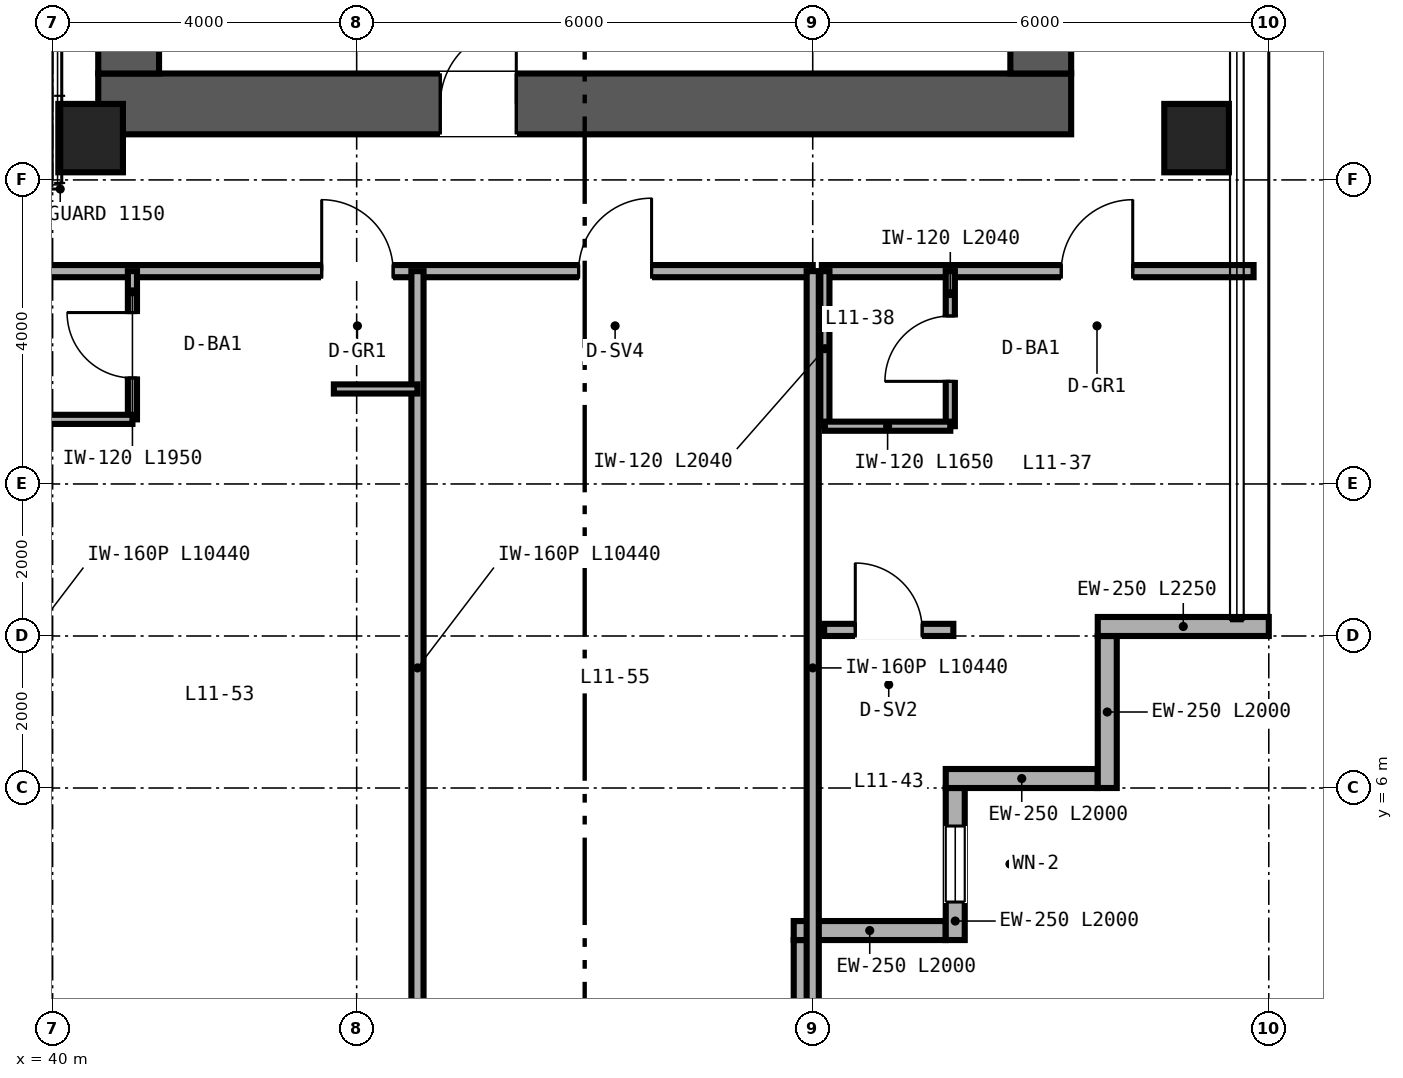
"""IFC4 building model, lengths in metres.
Left out: names, types, materials, properties, quantities, classifications, styles, units other than length and angle.
Written with IfcOpenShell. Run it as: python <this file> out.ifc"""

import sys

from ifc_helpers import new_model, si_unit, direction, frame, frame_2d, origin, origin_2d, place, context, subcontext, project, spatial, rectangle, hollow_rectangle, extrude, source, transform, mapped, element, fill, save


model = new_model("IFC4")
c1 = context("Model", 3, precision=1e-05, world=origin(), true_north=direction((0.0, 1.0)))
c2 = subcontext(c1, "Body", "Model", "MODEL_VIEW")
j1 = project(units=[si_unit("LENGTHUNIT", "METRE"), si_unit("PLANEANGLEUNIT", "RADIAN")], contexts=[c1])
p1 = place(None, origin())
s1 = spatial("IfcSite", under=j1, at=p1, CompositionType="ELEMENT")
p2 = place(p1, origin())
s2 = spatial("IfcBuilding", under=s1, at=p2, CompositionType="ELEMENT")
p3 = place(p2, frame((0.0, 0.0, 49.2)))
s3 = spatial("IfcBuildingStorey", under=s2, at=p3, CompositionType="ELEMENT", Elevation=49.2)
p4 = place(p3, frame((40.6, 15.0, 0.0), z_axis=(0.0, 0.0, 1.0), x_axis=(1.0, 0.0, 0.0)))
e1 = element("IfcWall", 1, at=p4, inside=s3, PredefinedType="SHEAR", context=c2, shape_type="SweptSolid", body=[
    extrude(rectangle(XDim=12.8, YDim=0.8, at=frame_2d((6.4, 0.0))), origin(), (0.0, 0.0, 1.0), 3.35),
])
p5 = place(p4, frame((4.5, 0.0, 0.0)))
e2 = element("IfcOpeningElement", 2, at=p5, cuts=e1, PredefinedType="OPENING", context=c2, shape_type="SweptSolid", body=[
    extrude(rectangle(XDim=1.0, YDim=2.15, at=frame_2d((0.5, 1.075))), frame((0.0, 0.41, 0.0), z_axis=(0.0, -1.0, 0.0), x_axis=(1.0, 0.0, 0.0)), (0.0, 0.0, 1.0), 0.82),
])
for number, where, z_axis, x_axis in (
    (3, (41.0, 15.4, 0.0), (0.0, 0.0, 1.0), (0.0, 1.0, 0.0)),
    (4, (53.0, 15.4, 0.0), (0.0, 0.0, 1.0), (0.0, 1.0, 0.0)),
):
    element("IfcWall", number, at=place(p3, frame(where, z_axis=z_axis, x_axis=x_axis)), inside=s3, PredefinedType="SHEAR", context=c2, shape_type="SweptSolid", body=[
        extrude(rectangle(XDim=21.2, YDim=0.8, at=frame_2d((10.6, 0.0))), origin(), (0.0, 0.0, 1.0), 3.35),
    ])
m1 = source(origin(), c2, "Body", "SweptSolid", [
    extrude(hollow_rectangle(XDim=0.85, YDim=0.9, WallThickness=0.04, at=origin_2d()), origin(), (0.0, 0.0, 1.0), 3.35),
])
for number, where, z_axis, x_axis in (
    (5, (40.5, 14.55, 0.0), (0.0, 0.0, 1.0), (1.0, 0.0, 0.0)),
    (6, (55.05, 14.55, 0.0), (0.0, 0.0, 1.0), (1.0, 0.0, 0.0)),
):
    element("IfcColumn", number, at=place(p3, frame(where, z_axis=z_axis, x_axis=x_axis)), inside=s3, PredefinedType="COLUMN", context=c2, shape_type="MappedRepresentation", body=[
        mapped(m1, transform((0.0, 0.0, 0.0), scale=1.0)),
    ])
p6 = place(p3, frame((49.875, 2.0, 0.0), z_axis=(0.0, 0.0, 1.0), x_axis=(0.0, 1.0, 0.0)))
e7 = element("IfcWall", 7, at=p6, inside=s3, PredefinedType="SOLIDWALL", context=c2, shape_type="SweptSolid", body=[
    extrude(rectangle(XDim=2.0, YDim=0.25, at=frame_2d((1.0, 0.0))), origin(), (0.0, 0.0, 1.0), 2.657),
])
p7 = place(p3, frame((49.75, 4.125, 0.0), z_axis=(0.0, 0.0, 1.0), x_axis=(1.0, 0.0, 0.0)))
e8 = element("IfcWall", 8, at=p7, inside=s3, PredefinedType="SOLIDWALL", context=c2, shape_type="SweptSolid", body=[
    extrude(rectangle(XDim=2.0, YDim=0.25, at=frame_2d((1.0, 0.0))), origin(), (0.0, 0.0, 1.0), 3.35),
])
p8 = place(p3, frame((51.875, 4.0, 0.0), z_axis=(0.0, 0.0, 1.0), x_axis=(0.0, 1.0, 0.0)))
e9 = element("IfcWall", 9, at=p8, inside=s3, PredefinedType="SOLIDWALL", context=c2, shape_type="SweptSolid", body=[
    extrude(rectangle(XDim=2.0, YDim=0.25, at=frame_2d((1.0, 0.0))), origin(), (0.0, 0.0, 1.0), 3.35),
])
p9 = place(p8, frame((0.5, 0.0, 0.85)))
e10 = element("IfcOpeningElement", 10, at=p9, cuts=e9, PredefinedType="OPENING", context=c2, shape_type="SweptSolid", body=[
    extrude(rectangle(XDim=1.0, YDim=1.9, at=frame_2d((0.5, 0.95))), frame((0.0, 0.135, 0.0), z_axis=(0.0, -1.0, 0.0), x_axis=(1.0, 0.0, 0.0)), (0.0, 0.0, 1.0), 0.27),
])
for number, where, z_axis, x_axis in (
    (11, (51.75, 6.125, 0.0), (0.0, 0.0, 1.0), (1.0, 0.0, 0.0)),
    (12, (53.875, 6.0, 0.0), (0.0, 0.0, 1.0), (0.0, 1.0, 0.0)),
):
    element("IfcWall", number, at=place(p3, frame(where, z_axis=z_axis, x_axis=x_axis)), inside=s3, PredefinedType="SOLIDWALL", context=c2, shape_type="SweptSolid", body=[
        extrude(rectangle(XDim=2.0, YDim=0.25, at=frame_2d((1.0, 0.0))), origin(), (0.0, 0.0, 1.0), 3.35),
    ])
p10 = place(p3, frame((53.75, 8.125, 0.0), z_axis=(0.0, 0.0, 1.0), x_axis=(1.0, 0.0, 0.0)))
e13 = element("IfcWall", 13, at=p10, inside=s3, PredefinedType="SOLIDWALL", context=c2, shape_type="SweptSolid", body=[
    extrude(rectangle(XDim=2.25, YDim=0.25, at=frame_2d((1.125, 0.0))), origin(), (0.0, 0.0, 1.0), 3.35),
])
p11 = place(p3, frame((50.12, 12.8, 0.0), z_axis=(0.0, 0.0, 1.0), x_axis=(1.0, 0.0, 0.0)))
e14 = element("IfcWall", 14, at=p11, inside=s3, PredefinedType="PARTITIONING", context=c2, shape_type="SweptSolid", body=[
    extrude(rectangle(XDim=5.68, YDim=0.16, at=frame_2d((2.84, 0.0))), origin(), (0.0, 0.0, 1.0), 3.35),
])
p12 = place(p11, frame((3.15, 0.0, 0.0)))
e15 = element("IfcOpeningElement", 15, at=p12, cuts=e14, PredefinedType="OPENING", context=c2, shape_type="SweptSolid", body=[
    extrude(rectangle(XDim=0.94, YDim=2.15, at=frame_2d((0.47, 1.075))), frame((0.0, 0.09, 0.0), z_axis=(0.0, -1.0, 0.0), x_axis=(1.0, 0.0, 0.0)), (0.0, 0.0, 1.0), 0.18),
])
p13 = place(p3, frame((51.81, 10.76, 0.0), z_axis=(0.0, 0.0, 1.0), x_axis=(0.0, 1.0, 0.0)))
e16 = element("IfcWall", 16, at=p13, inside=s3, PredefinedType="PARTITIONING", context=c2, shape_type="SweptSolid", body=[
    extrude(rectangle(XDim=2.04, YDim=0.12, at=frame_2d((1.02, 0.0))), origin(), (0.0, 0.0, 1.0), 3.35),
])
p14 = place(p13, frame((0.59, 0.0, 0.0)))
e17 = element("IfcOpeningElement", 17, at=p14, cuts=e16, PredefinedType="OPENING", context=c2, shape_type="SweptSolid", body=[
    extrude(rectangle(XDim=0.86, YDim=2.1, at=frame_2d((0.43, 1.05))), frame((0.0, 0.07, 0.0), z_axis=(0.0, -1.0, 0.0), x_axis=(1.0, 0.0, 0.0)), (0.0, 0.0, 1.0), 0.14),
])
p15 = place(p3, frame((50.16, 10.76, 0.0), z_axis=(0.0, 0.0, 1.0), x_axis=(0.0, 1.0, 0.0)))
e18 = element("IfcWall", 18, at=p15, inside=s3, PredefinedType="PARTITIONING", context=c2, shape_type="SweptSolid", body=[
    extrude(rectangle(XDim=2.04, YDim=0.12, at=frame_2d((1.02, 0.0))), origin(), (0.0, 0.0, 1.0), 3.35),
])
p16 = place(p3, frame((50.16, 10.76, 0.0), z_axis=(0.0, 0.0, 1.0), x_axis=(1.0, 0.0, 0.0)))
e19 = element("IfcWall", 19, at=p16, inside=s3, PredefinedType="PARTITIONING", context=c2, shape_type="SweptSolid", body=[
    extrude(rectangle(XDim=1.65, YDim=0.12, at=frame_2d((0.825, 0.0))), origin(), (0.0, 0.0, 1.0), 3.35),
])
p17 = place(p3, frame((50.15, 8.08, 0.0), z_axis=(0.0, 0.0, 1.0), x_axis=(1.0, 0.0, 0.0)))
e20 = element("IfcWall", 20, at=p17, inside=s3, PredefinedType="PARTITIONING", context=c2, shape_type="SweptSolid", body=[
    extrude(rectangle(XDim=1.7, YDim=0.16, at=frame_2d((0.85, 0.0))), origin(), (0.0, 0.0, 1.0), 3.35),
])
p18 = place(p17, frame((0.41, 0.0, 0.0)))
e21 = element("IfcOpeningElement", 21, at=p18, cuts=e20, PredefinedType="OPENING", context=c2, shape_type="SweptSolid", body=[
    extrude(rectangle(XDim=0.88, YDim=2.15, at=frame_2d((0.44, 1.075))), frame((0.0, 0.09, 0.0), z_axis=(0.0, -1.0, 0.0), x_axis=(1.0, 0.0, 0.0)), (0.0, 0.0, 1.0), 0.18),
])
p19 = place(p3, frame((14.0, 12.8, 0.0), z_axis=(0.0, 0.0, 1.0), x_axis=(1.0, 0.0, 0.0)))
e22 = element("IfcWall", 22, at=p19, inside=s3, PredefinedType="PARTITIONING", context=c2, shape_type="SweptSolid", body=[
    extrude(rectangle(XDim=36.0, YDim=0.16, at=frame_2d((18.0, 0.0))), origin(), (0.0, 0.0, 1.0), 2.571),
])
p20 = place(p19, frame((5.14, 0.0, 0.0)))
e23 = element("IfcOpeningElement", 23, at=p20, cuts=e22, PredefinedType="OPENING", context=c2, shape_type="SweptSolid", body=[
    extrude(rectangle(XDim=0.94, YDim=2.15, at=frame_2d((0.47, 1.075))), frame((0.0, 0.09, 0.0), z_axis=(0.0, -1.0, 0.0), x_axis=(1.0, 0.0, 0.0)), (0.0, 0.0, 1.0), 0.18),
])
p21 = place(p19, frame((11.34, 0.0, 0.0)))
e24 = element("IfcOpeningElement", 24, at=p21, cuts=e22, PredefinedType="OPENING", context=c2, shape_type="SweptSolid", body=[
    extrude(rectangle(XDim=0.94, YDim=2.15, at=frame_2d((0.47, 1.075))), frame((0.0, 0.09, 0.0), z_axis=(0.0, -1.0, 0.0), x_axis=(1.0, 0.0, 0.0)), (0.0, 0.0, 1.0), 0.18),
])
p22 = place(p19, frame((17.94, 0.0, 0.0)))
e25 = element("IfcOpeningElement", 25, at=p22, cuts=e22, PredefinedType="OPENING", context=c2, shape_type="SweptSolid", body=[
    extrude(rectangle(XDim=0.94, YDim=2.15, at=frame_2d((0.47, 1.075))), frame((0.0, 0.09, 0.0), z_axis=(0.0, -1.0, 0.0), x_axis=(1.0, 0.0, 0.0)), (0.0, 0.0, 1.0), 0.18),
])
p23 = place(p19, frame((21.82, 0.0, 0.0)))
e26 = element("IfcOpeningElement", 26, at=p23, cuts=e22, PredefinedType="OPENING", context=c2, shape_type="SweptSolid", body=[
    extrude(rectangle(XDim=0.96, YDim=2.15, at=frame_2d((0.48, 1.075))), frame((0.0, 0.09, 0.0), z_axis=(0.0, -1.0, 0.0), x_axis=(1.0, 0.0, 0.0)), (0.0, 0.0, 1.0), 0.18),
])
p24 = place(p19, frame((29.54, 0.0, 0.0)))
e27 = element("IfcOpeningElement", 27, at=p24, cuts=e22, PredefinedType="OPENING", context=c2, shape_type="SweptSolid", body=[
    extrude(rectangle(XDim=0.94, YDim=2.15, at=frame_2d((0.47, 1.075))), frame((0.0, 0.09, 0.0), z_axis=(0.0, -1.0, 0.0), x_axis=(1.0, 0.0, 0.0)), (0.0, 0.0, 1.0), 0.18),
])
p25 = place(p19, frame((32.92, 0.0, 0.0)))
e28 = element("IfcOpeningElement", 28, at=p25, cuts=e22, PredefinedType="OPENING", context=c2, shape_type="SweptSolid", body=[
    extrude(rectangle(XDim=0.96, YDim=2.15, at=frame_2d((0.48, 1.075))), frame((0.0, 0.09, 0.0), z_axis=(0.0, -1.0, 0.0), x_axis=(1.0, 0.0, 0.0)), (0.0, 0.0, 1.0), 0.18),
])
for number, where, z_axis, x_axis in (
    (29, (50.0, 2.36, 0.0), (0.0, 0.0, 1.0), (0.0, 1.0, 0.0)),
    (30, (44.8, 2.36, 0.0), (0.0, 0.0, 1.0), (0.0, 1.0, 0.0)),
):
    element("IfcWall", number, at=place(p3, frame(where, z_axis=z_axis, x_axis=x_axis)), inside=s3, PredefinedType="PARTITIONING", context=c2, shape_type="SweptSolid", body=[
        extrude(rectangle(XDim=10.44, YDim=0.16, at=frame_2d((5.22, 0.0))), origin(), (0.0, 0.0, 1.0), 2.657),
    ])
p26 = place(p3, frame((41.05, 10.85, 0.0), z_axis=(0.0, 0.0, 1.0), x_axis=(0.0, 1.0, 0.0)))
e31 = element("IfcWall", 31, at=p26, inside=s3, PredefinedType="PARTITIONING", context=c2, shape_type="SweptSolid", body=[
    extrude(rectangle(XDim=1.95, YDim=0.12, at=frame_2d((0.975, 0.0))), origin(), (0.0, 0.0, 1.0), 3.35),
])
p27 = place(p26, frame((0.545, 0.0, 0.0)))
e32 = element("IfcOpeningElement", 32, at=p27, cuts=e31, PredefinedType="OPENING", context=c2, shape_type="SweptSolid", body=[
    extrude(rectangle(XDim=0.86, YDim=2.1, at=frame_2d((0.43, 1.05))), frame((0.0, 0.07, 0.0), z_axis=(0.0, -1.0, 0.0), x_axis=(1.0, 0.0, 0.0)), (0.0, 0.0, 1.0), 0.14),
])
p28 = place(p3, frame((39.4, 10.85, 0.0), z_axis=(0.0, 0.0, 1.0), x_axis=(1.0, 0.0, 0.0)))
e33 = element("IfcWall", 33, at=p28, inside=s3, PredefinedType="PARTITIONING", context=c2, shape_type="SweptSolid", body=[
    extrude(rectangle(XDim=1.65, YDim=0.12, at=frame_2d((0.825, 0.0))), origin(), (0.0, 0.0, 1.0), 2.571),
])
p29 = place(p3, frame((43.7, 11.25, 0.0), z_axis=(0.0, 0.0, 1.0), x_axis=(1.0, 0.0, 0.0)))
e34 = element("IfcWall", 34, at=p29, inside=s3, PredefinedType="PARTITIONING", context=c2, shape_type="SweptSolid", body=[
    extrude(rectangle(XDim=1.1, YDim=0.12, at=frame_2d((0.55, 0.0))), origin(), (0.0, 0.0, 1.0), 3.35),
])
m2 = source(origin(), c2, "Body", "SweptSolid", [
    extrude(rectangle(XDim=1.0, YDim=1.9, at=frame_2d((0.5, 0.95))), frame((0.0, 0.03, 0.0), z_axis=(0.0, -1.0, 0.0), x_axis=(1.0, 0.0, 0.0)), (0.0, 0.0, 1.0), 0.06),
])
p30 = place(p9, origin())
e35 = element("IfcWindow", 35, at=p30, inside=s3, PartitioningType="SINGLE_PANEL", PredefinedType="WINDOW", context=c2, shape_type="MappedRepresentation", body=[
    mapped(m2, transform((0.0, 0.0, 0.0), scale=1.0)),
])
fill(e10, e35)
m3 = source(origin(), c2, "Body", "SweptSolid", [
    extrude(rectangle(XDim=1.0, YDim=2.15, at=frame_2d((0.5, 1.075))), frame((0.0, 0.025, 0.0), z_axis=(0.0, -1.0, 0.0), x_axis=(1.0, 0.0, 0.0)), (0.0, 0.0, 1.0), 0.05),
])
p31 = place(p5, origin())
e36 = element("IfcDoor", 36, at=p31, inside=s3, OperationType="SINGLE_SWING_RIGHT", PredefinedType="DOOR", context=c2, shape_type="MappedRepresentation", body=[
    mapped(m3, transform((0.0, 0.0, 0.0), scale=1.0)),
])
fill(e2, e36)
m4 = source(origin(), c2, "Body", "SweptSolid", [
    extrude(rectangle(XDim=0.86, YDim=2.1, at=frame_2d((0.43, 1.05))), frame((0.0, 0.025, 0.0), z_axis=(0.0, -1.0, 0.0), x_axis=(1.0, 0.0, 0.0)), (0.0, 0.0, 1.0), 0.05),
])
p32 = place(p14, origin())
e37 = element("IfcDoor", 37, at=p32, inside=s3, OperationType="SINGLE_SWING_LEFT", PredefinedType="DOOR", context=c2, shape_type="MappedRepresentation", body=[
    mapped(m4, transform((0.0, 0.0, 0.0), scale=1.0)),
])
fill(e17, e37)
m5 = source(origin(), c2, "Body", "SweptSolid", [
    extrude(rectangle(XDim=0.94, YDim=2.15, at=frame_2d((0.47, 1.075))), frame((0.0, 0.025, 0.0), z_axis=(0.0, -1.0, 0.0), x_axis=(1.0, 0.0, 0.0)), (0.0, 0.0, 1.0), 0.05),
])
p33 = place(p12, origin())
e38 = element("IfcDoor", 38, at=p33, inside=s3, OperationType="SINGLE_SWING_RIGHT", PredefinedType="DOOR", context=c2, shape_type="MappedRepresentation", body=[
    mapped(m5, transform((0.0, 0.0, 0.0), scale=1.0)),
])
fill(e15, e38)
m6 = source(origin(), c2, "Body", "SweptSolid", [
    extrude(rectangle(XDim=0.88, YDim=2.15, at=frame_2d((0.44, 1.075))), frame((0.0, 0.025, 0.0), z_axis=(0.0, -1.0, 0.0), x_axis=(1.0, 0.0, 0.0)), (0.0, 0.0, 1.0), 0.05),
])
p34 = place(p18, origin())
e39 = element("IfcDoor", 39, at=p34, inside=s3, OperationType="SINGLE_SWING_LEFT", PredefinedType="DOOR", context=c2, shape_type="MappedRepresentation", body=[
    mapped(m6, transform((0.0, 0.0, 0.0), scale=1.0)),
])
fill(e21, e39)
p35 = place(p27, origin())
e40 = element("IfcDoor", 40, at=p35, inside=s3, OperationType="SINGLE_SWING_RIGHT", PredefinedType="DOOR", context=c2, shape_type="MappedRepresentation", body=[
    mapped(m4, transform((0.0, 0.0, 0.0), scale=1.0)),
])
fill(e32, e40)
p36 = place(p24, origin())
e41 = element("IfcDoor", 41, at=p36, inside=s3, OperationType="SINGLE_SWING_LEFT", PredefinedType="DOOR", context=c2, shape_type="MappedRepresentation", body=[
    mapped(m5, transform((0.0, 0.0, 0.0), scale=1.0)),
])
fill(e27, e41)
m7 = source(origin(), c2, "Body", "SweptSolid", [
    extrude(rectangle(XDim=0.96, YDim=2.15, at=frame_2d((0.48, 1.075))), frame((0.0, 0.025, 0.0), z_axis=(0.0, -1.0, 0.0), x_axis=(1.0, 0.0, 0.0)), (0.0, 0.0, 1.0), 0.05),
])
p37 = place(p25, origin())
e42 = element("IfcDoor", 42, at=p37, inside=s3, OperationType="SINGLE_SWING_RIGHT", PredefinedType="DOOR", context=c2, shape_type="MappedRepresentation", body=[
    mapped(m7, transform((0.0, 0.0, 0.0), scale=1.0)),
])
fill(e28, e42)
save(model, sys.argv[1])
